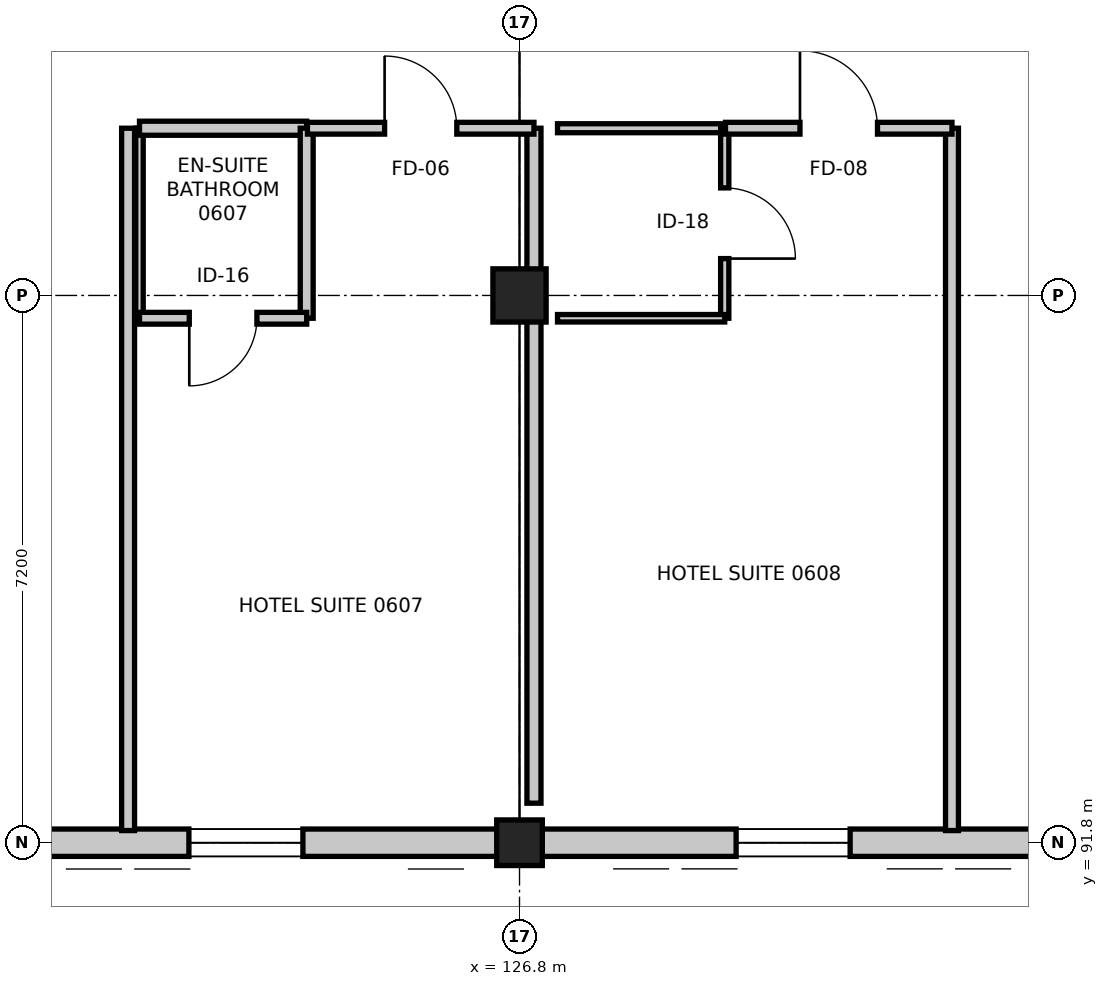
"""IFC4 building model, lengths in metres.
Left out: names, types, materials, properties, quantities, classifications, styles, units other than length and angle.
Written with IfcOpenShell. Run it as: python <this file> out.ifc"""

import sys

from ifc_helpers import new_model, si_unit, direction, frame, frame_2d, origin, origin_2d, place, context, subcontext, project, spatial, rectangle, extrude, element, fill, save


model = new_model("IFC4")
c1 = context("Model", 3, precision=1e-05, world=origin(), true_north=direction((0.0, 1.0)))
c2 = subcontext(c1, "Body", "Model", "MODEL_VIEW")
j1 = project(units=[si_unit("LENGTHUNIT", "METRE"), si_unit("PLANEANGLEUNIT", "RADIAN")], contexts=[c1])
p1 = place(None, origin())
s1 = spatial("IfcSite", under=j1, at=p1, CompositionType="ELEMENT")
p2 = place(p1, origin())
s2 = spatial("IfcBuilding", under=s1, at=p2, CompositionType="ELEMENT")
p3 = place(p2, frame((0.0, 0.0, 26.4)))
s3 = spatial("IfcBuildingStorey", under=s2, at=p3, CompositionType="ELEMENT", Elevation=26.4)
p4 = place(p3, frame((126.8, 91.8, 0.0), z_axis=(0.0, 0.0, 1.0), x_axis=(1.0, 0.0, 0.0)))
e1 = element("IfcColumn", 1, at=p4, inside=s3, PredefinedType="COLUMN", context=c2, shape_type="SweptSolid", body=[
    extrude(rectangle(XDim=0.6, YDim=0.6, at=origin_2d()), origin(), (0.0, 0.0, 1.0), 3.6),
])
p5 = place(p3, frame((126.8, 99.0, 0.0), z_axis=(0.0, 0.0, 1.0), x_axis=(1.0, 0.0, 0.0)))
e2 = element("IfcColumn", 2, at=p5, inside=s3, PredefinedType="COLUMN", context=c2, shape_type="SweptSolid", body=[
    extrude(rectangle(XDim=0.7, YDim=0.7, at=origin_2d()), origin(), (0.0, 0.0, 1.0), 3.6),
])
p6 = place(p3, frame((134.0, 91.8, 0.0), z_axis=(0.0, 0.0, 1.0), x_axis=(-1.0, 0.0, 0.0)))
e3 = element("IfcWall", 3, at=p6, inside=s3, PredefinedType="STANDARD", context=c2, shape_type="SweptSolid", body=[
    extrude(rectangle(XDim=7.2, YDim=0.36, at=frame_2d((3.6, 0.0))), origin(), (0.0, 0.0, 1.0), 2.735),
])
p7 = place(p6, frame((2.85, 0.0, 0.75)))
e4 = element("IfcOpeningElement", 4, at=p7, cuts=e3, PredefinedType="OPENING", context=c2, shape_type="SweptSolid", body=[
    extrude(rectangle(XDim=1.5, YDim=1.5, at=frame_2d((0.75, 0.75))), frame((0.0, 0.19, 0.0), z_axis=(0.0, -1.0, 0.0), x_axis=(1.0, 0.0, 0.0)), (0.0, 0.0, 1.0), 0.38),
])
p8 = place(p3, frame((126.8, 91.8, 0.0), z_axis=(0.0, 0.0, 1.0), x_axis=(-1.0, 0.0, 0.0)))
e5 = element("IfcWall", 5, at=p8, inside=s3, PredefinedType="STANDARD", context=c2, shape_type="SweptSolid", body=[
    extrude(rectangle(XDim=7.2, YDim=0.36, at=frame_2d((3.6, 0.0))), origin(), (0.0, 0.0, 1.0), 2.735),
])
p9 = place(p8, frame((2.85, 0.0, 0.75)))
e6 = element("IfcOpeningElement", 6, at=p9, cuts=e5, PredefinedType="OPENING", context=c2, shape_type="SweptSolid", body=[
    extrude(rectangle(XDim=1.5, YDim=1.5, at=frame_2d((0.75, 0.75))), frame((0.0, 0.19, 0.0), z_axis=(0.0, -1.0, 0.0), x_axis=(1.0, 0.0, 0.0)), (0.0, 0.0, 1.0), 0.38),
])
p10 = place(p3, frame((121.8, 98.7, 0.0), z_axis=(0.0, 0.0, 1.0), x_axis=(0.0, 1.0, 0.0)))
e7 = element("IfcWall", 7, at=p10, inside=s3, PredefinedType="PARTITIONING", context=c2, shape_type="SweptSolid", body=[
    extrude(rectangle(XDim=2.5, YDim=0.098, at=frame_2d((1.25, 0.0))), origin(), (0.0, 0.0, 1.0), 2.735),
])
p11 = place(p3, frame((121.8, 101.2, 0.0), z_axis=(0.0, 0.0, 1.0), x_axis=(1.0, 0.0, 0.0)))
e8 = element("IfcWall", 8, at=p11, inside=s3, PredefinedType="PARTITIONING", context=c2, shape_type="SweptSolid", body=[
    extrude(rectangle(XDim=2.2, YDim=0.185, at=frame_2d((1.1, 0.0))), origin(), (0.0, 0.0, 1.0), 3.35),
])
p12 = place(p3, frame((124.0, 101.2, 0.0), z_axis=(0.0, 0.0, 1.0), x_axis=(0.0, -1.0, 0.0)))
e9 = element("IfcWall", 9, at=p12, inside=s3, PredefinedType="PARTITIONING", context=c2, shape_type="SweptSolid", body=[
    extrude(rectangle(XDim=2.5, YDim=0.17, at=frame_2d((1.25, 0.0))), origin(), (0.0, 0.0, 1.0), 2.735),
])
p13 = place(p3, frame((124.0, 98.7, 0.0), z_axis=(0.0, 0.0, 1.0), x_axis=(-1.0, 0.0, 0.0)))
e10 = element("IfcWall", 10, at=p13, inside=s3, PredefinedType="PARTITIONING", context=c2, shape_type="SweptSolid", body=[
    extrude(rectangle(XDim=2.2, YDim=0.155, at=frame_2d((1.1, 0.0))), origin(), (0.0, 0.0, 1.0), 3.35),
])
p14 = place(p13, frame((0.655, 0.0, 0.0)))
e11 = element("IfcOpeningElement", 11, at=p14, cuts=e10, PredefinedType="OPENING", context=c2, shape_type="SweptSolid", body=[
    extrude(rectangle(XDim=0.89, YDim=2.09, at=frame_2d((0.445, 1.045))), frame((0.0, 0.087, 0.0), z_axis=(0.0, -1.0, 0.0), x_axis=(1.0, 0.0, 0.0)), (0.0, 0.0, 1.0), 0.175),
])
p15 = place(p3, frame((126.99, 101.2, 0.0), z_axis=(0.0, 0.0, 1.0), x_axis=(0.0, -1.0, 0.0)))
e12 = element("IfcWall", 12, at=p15, inside=s3, PredefinedType="PARTITIONING", context=c2, shape_type="SweptSolid", body=[
    extrude(rectangle(XDim=8.88, YDim=0.185, at=frame_2d((4.44, 0.0))), origin(), (0.0, 0.0, 1.0), 2.685),
])
p16 = place(p3, frame((121.65, 91.96, 0.0), z_axis=(0.0, 0.0, 1.0), x_axis=(0.0, 1.0, 0.0)))
e13 = element("IfcWall", 13, at=p16, inside=s3, PredefinedType="PARTITIONING", context=c2, shape_type="SweptSolid", body=[
    extrude(rectangle(XDim=9.24, YDim=0.17, at=frame_2d((4.62, 0.0))), origin(), (0.0, 0.0, 1.0), 2.735),
])
p17 = place(p3, frame((124.01, 101.2, 0.0), z_axis=(0.0, 0.0, 1.0), x_axis=(1.0, 0.0, 0.0)))
e14 = element("IfcWall", 14, at=p17, inside=s3, PredefinedType="PARTITIONING", context=c2, shape_type="SweptSolid", body=[
    extrude(rectangle(XDim=2.98, YDim=0.155, at=frame_2d((1.49, 0.0))), origin(), (0.0, 0.0, 1.0), 2.685),
])
p18 = place(p17, frame((1.015, 0.0, 0.0)))
e15 = element("IfcOpeningElement", 15, at=p18, cuts=e14, PredefinedType="OPENING", context=c2, shape_type="SweptSolid", body=[
    extrude(rectangle(XDim=0.95, YDim=2.1, at=frame_2d((0.475, 1.05))), frame((0.0, 0.087, 0.0), z_axis=(0.0, -1.0, 0.0), x_axis=(1.0, 0.0, 0.0)), (0.0, 0.0, 1.0), 0.175),
])
p19 = place(p3, frame((127.3, 101.2, 0.0), z_axis=(0.0, 0.0, 1.0), x_axis=(1.0, 0.0, 0.0)))
e16 = element("IfcWall", 16, at=p19, inside=s3, PredefinedType="PARTITIONING", context=c2, shape_type="SweptSolid", body=[
    extrude(rectangle(XDim=2.2, YDim=0.118, at=frame_2d((1.1, 0.0))), origin(), (0.0, 0.0, 1.0), 3.35),
])
p20 = place(p3, frame((129.5, 101.2, 0.0), z_axis=(0.0, 0.0, 1.0), x_axis=(0.0, -1.0, 0.0)))
e17 = element("IfcWall", 17, at=p20, inside=s3, PredefinedType="PARTITIONING", context=c2, shape_type="SweptSolid", body=[
    extrude(rectangle(XDim=2.5, YDim=0.108, at=frame_2d((1.25, 0.0))), origin(), (0.0, 0.0, 1.0), 2.735),
])
p21 = place(p20, frame((0.785, 0.0, 0.0)))
e18 = element("IfcOpeningElement", 18, at=p21, cuts=e17, PredefinedType="OPENING", context=c2, shape_type="SweptSolid", body=[
    extrude(rectangle(XDim=0.93, YDim=2.13, at=frame_2d((0.465, 1.065))), frame((0.0, 0.064, 0.0), z_axis=(0.0, -1.0, 0.0), x_axis=(1.0, 0.0, 0.0)), (0.0, 0.0, 1.0), 0.128),
])
p22 = place(p3, frame((129.5, 98.7, 0.0), z_axis=(0.0, 0.0, 1.0), x_axis=(-1.0, 0.0, 0.0)))
e19 = element("IfcWall", 19, at=p22, inside=s3, PredefinedType="PARTITIONING", context=c2, shape_type="SweptSolid", body=[
    extrude(rectangle(XDim=2.2, YDim=0.098, at=frame_2d((1.1, 0.0))), origin(), (0.0, 0.0, 1.0), 3.35),
])
p23 = place(p3, frame((132.49, 101.2, 0.0), z_axis=(0.0, 0.0, 1.0), x_axis=(0.0, -1.0, 0.0)))
e20 = element("IfcWall", 20, at=p23, inside=s3, PredefinedType="PARTITIONING", context=c2, shape_type="SweptSolid", body=[
    extrude(rectangle(XDim=9.24, YDim=0.17, at=frame_2d((4.62, 0.0))), origin(), (0.0, 0.0, 1.0), 2.735),
])
p24 = place(p3, frame((129.51, 101.2, 0.0), z_axis=(0.0, 0.0, 1.0), x_axis=(1.0, 0.0, 0.0)))
e21 = element("IfcWall", 21, at=p24, inside=s3, PredefinedType="PARTITIONING", context=c2, shape_type="SweptSolid", body=[
    extrude(rectangle(XDim=2.98, YDim=0.155, at=frame_2d((1.49, 0.0))), origin(), (0.0, 0.0, 1.0), 3.35),
])
p25 = place(p24, frame((0.98, 0.0, 0.0)))
e22 = element("IfcOpeningElement", 22, at=p25, cuts=e21, PredefinedType="OPENING", context=c2, shape_type="SweptSolid", body=[
    extrude(rectangle(XDim=1.02, YDim=2.15, at=frame_2d((0.51, 1.075))), frame((0.0, 0.087, 0.0), z_axis=(0.0, -1.0, 0.0), x_axis=(1.0, 0.0, 0.0)), (0.0, 0.0, 1.0), 0.175),
])
p26 = place(p7, origin())
e23 = element("IfcWindow", 23, at=p26, inside=s3, PartitioningType="SINGLE_PANEL", PredefinedType="WINDOW", context=c2, shape_type="SweptSolid", body=[
    extrude(rectangle(XDim=1.5, YDim=1.5, at=frame_2d((0.75, 0.75))), frame((0.0, 0.03, 0.0), z_axis=(0.0, -1.0, 0.0), x_axis=(1.0, 0.0, 0.0)), (0.0, 0.0, 1.0), 0.06),
])
fill(e4, e23)
p27 = place(p9, origin())
e24 = element("IfcWindow", 24, at=p27, inside=s3, PartitioningType="SINGLE_PANEL", PredefinedType="WINDOW", context=c2, shape_type="SweptSolid", body=[
    extrude(rectangle(XDim=1.5, YDim=1.5, at=frame_2d((0.75, 0.75))), frame((0.0, 0.03, 0.0), z_axis=(0.0, -1.0, 0.0), x_axis=(1.0, 0.0, 0.0)), (0.0, 0.0, 1.0), 0.06),
])
fill(e6, e24)
p28 = place(p14, origin())
e25 = element("IfcDoor", 25, at=p28, inside=s3, OperationType="SINGLE_SWING_RIGHT", PredefinedType="DOOR", context=c2, shape_type="SweptSolid", body=[
    extrude(rectangle(XDim=0.89, YDim=2.09, at=frame_2d((0.445, 1.045))), frame((0.0, 0.025, 0.0), z_axis=(0.0, -1.0, 0.0), x_axis=(1.0, 0.0, 0.0)), (0.0, 0.0, 1.0), 0.05),
])
fill(e11, e25)
p29 = place(p18, origin())
e26 = element("IfcDoor", 26, at=p29, inside=s3, OperationType="SINGLE_SWING_LEFT", PredefinedType="DOOR", context=c2, shape_type="SweptSolid", body=[
    extrude(rectangle(XDim=0.95, YDim=2.1, at=frame_2d((0.475, 1.05))), frame((0.0, 0.025, 0.0), z_axis=(0.0, -1.0, 0.0), x_axis=(1.0, 0.0, 0.0)), (0.0, 0.0, 1.0), 0.05),
])
fill(e15, e26)
p30 = place(p21, origin())
e27 = element("IfcDoor", 27, at=p30, inside=s3, OperationType="SINGLE_SWING_RIGHT", PredefinedType="DOOR", context=c2, shape_type="SweptSolid", body=[
    extrude(rectangle(XDim=0.93, YDim=2.13, at=frame_2d((0.465, 1.065))), frame((0.0, 0.025, 0.0), z_axis=(0.0, -1.0, 0.0), x_axis=(1.0, 0.0, 0.0)), (0.0, 0.0, 1.0), 0.05),
])
fill(e18, e27)
p31 = place(p25, origin())
e28 = element("IfcDoor", 28, at=p31, inside=s3, OperationType="SINGLE_SWING_LEFT", PredefinedType="DOOR", context=c2, shape_type="SweptSolid", body=[
    extrude(rectangle(XDim=1.02, YDim=2.15, at=frame_2d((0.51, 1.075))), frame((0.0, 0.025, 0.0), z_axis=(0.0, -1.0, 0.0), x_axis=(1.0, 0.0, 0.0)), (0.0, 0.0, 1.0), 0.05),
])
fill(e22, e28)
save(model, sys.argv[1])
